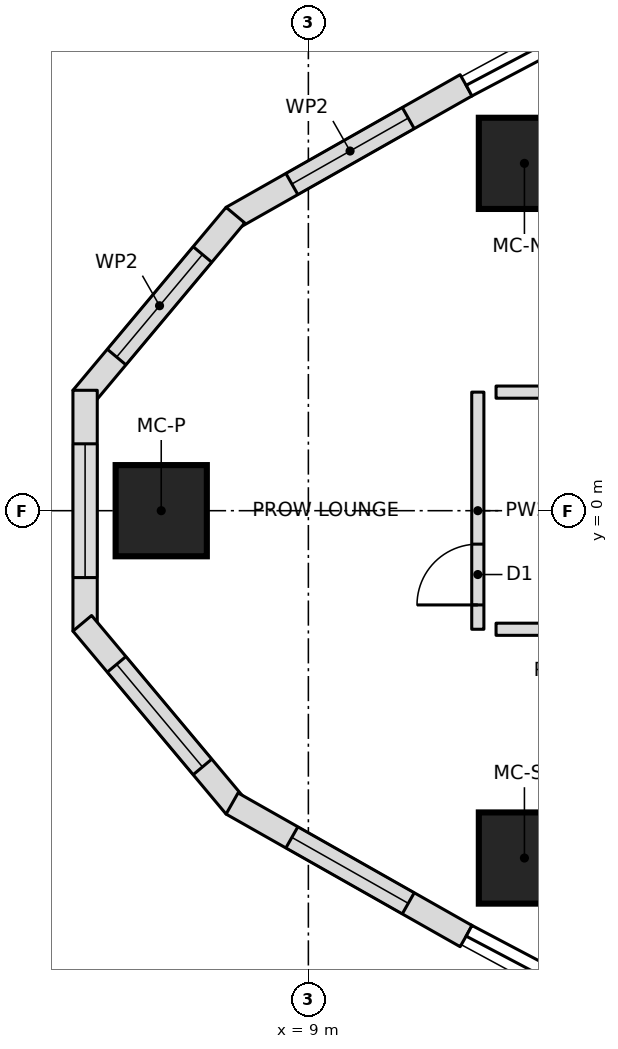
"""IFC4 building model, lengths in metres.
Left out: names, types, materials, properties, quantities, classifications, styles, units other than length and angle.
Written with IfcOpenShell. Run it as: python <this file> out.ifc"""

import sys

from ifc_helpers import new_model, si_unit, direction, frame, frame_2d, origin, origin_2d, place, context, subcontext, project, spatial, polyline, rectangle, outline, extrude, element, fill, save


model = new_model("IFC4")
c1 = context("Model", 3, precision=1e-05, world=origin(), true_north=direction((0.0, 1.0)))
c2 = subcontext(c1, "Body", "Model", "MODEL_VIEW")
j1 = project(units=[si_unit("LENGTHUNIT", "METRE"), si_unit("PLANEANGLEUNIT", "RADIAN")], contexts=[c1])
p1 = place(None, origin())
s1 = spatial("IfcSite", under=j1, at=p1, CompositionType="ELEMENT")
p2 = place(p1, origin())
s2 = spatial("IfcBuilding", under=s1, at=p2, CompositionType="ELEMENT")
p3 = place(p2, frame((0.0, 0.0, 137.3)))
s3 = spatial("IfcBuildingStorey", under=s2, at=p3, CompositionType="ELEMENT", Elevation=137.3)
for number, where, z_axis, x_axis in (
    (1, (6.58, 0.0, 0.0), (0.0, 0.0, 1.0), (1.0, 0.0, 0.0)),
    (2, (12.553, -5.713, 0.0), (0.0, 0.0, 1.0), (1.0, 0.0, 0.0)),
    (3, (12.553, 5.713, 0.0), (0.0, 0.0, 1.0), (1.0, 0.0, 0.0)),
):
    element("IfcColumn", number, at=place(p3, frame(where, z_axis=z_axis, x_axis=x_axis)), inside=s3, PredefinedType="COLUMN", context=c2, shape_type="SweptSolid", body=[
        extrude(rectangle(XDim=1.5, YDim=1.5, at=origin_2d()), origin(), (0.0, 0.0, 1.0), 3.55),
    ])
p4 = place(p3, frame((11.594, 6.997, 0.0), z_axis=(0.0, 0.0, 1.0), x_axis=(-0.870045255208, -0.492971859125, 0.0)))
e4 = element("IfcWall", 4, at=p4, inside=s3, PredefinedType="NOTDEFINED", context=c2, shape_type="SweptSolid", body=[
    extrude(outline(polyline([(0.0, -0.2), (4.424, -0.2), (4.352, 0.2), (0.0, 0.2), (0.0, -0.2)])), origin(), (0.0, 0.0, 1.0), 3.25),
])
p5 = place(p4, frame((1.094, 0.0, 0.6)))
e5 = element("IfcOpeningElement", 5, at=p5, cuts=e4, PredefinedType="OPENING", context=c2, shape_type="SweptSolid", body=[
    extrude(outline(polyline([(0.0, 1.35), (0.084, 1.771), (0.322, 2.128), (0.679, 2.366), (1.1, 2.45), (1.521, 2.366), (1.878, 2.128), (2.116, 1.771), (2.2, 1.35), (2.2, 1.1), (2.116, 0.679), (1.878, 0.322), (1.521, 0.084), (1.1, 0.0), (0.679, 0.084), (0.322, 0.322), (0.084, 0.679), (0.0, 1.1), (0.0, 1.35)])), frame((0.0, 0.21, 0.0), z_axis=(0.0, -1.0, 0.0), x_axis=(1.0, 0.0, 0.0)), (0.0, 0.0, 1.0), 0.42),
])
p6 = place(p3, frame((7.777, 4.834, 0.0), z_axis=(0.0, 0.0, 1.0), x_axis=(-0.641787918235, -0.766882173484, 0.0)))
e6 = element("IfcWall", 6, at=p6, inside=s3, PredefinedType="NOTDEFINED", context=c2, shape_type="SweptSolid", body=[
    extrude(outline(polyline([(-0.036, -0.2), (3.888, -0.2), (3.743, 0.2), (0.036, 0.2), (-0.036, -0.2)])), origin(), (0.0, 0.0, 1.0), 3.25),
])
p7 = place(p6, frame((0.808, 0.0, 0.6)))
e7 = element("IfcOpeningElement", 7, at=p7, cuts=e6, PredefinedType="OPENING", context=c2, shape_type="SweptSolid", body=[
    extrude(outline(polyline([(0.0, 1.35), (0.084, 1.771), (0.322, 2.128), (0.679, 2.366), (1.1, 2.45), (1.521, 2.366), (1.878, 2.128), (2.116, 1.771), (2.2, 1.35), (2.2, 1.1), (2.116, 0.679), (1.878, 0.322), (1.521, 0.084), (1.1, 0.0), (0.679, 0.084), (0.322, 0.322), (0.084, 0.679), (0.0, 1.1), (0.0, 1.35)])), frame((0.0, 0.21, 0.0), z_axis=(0.0, -1.0, 0.0), x_axis=(1.0, 0.0, 0.0)), (0.0, 0.0, 1.0), 0.42),
])
p8 = place(p3, frame((5.328, 1.908, 0.0), z_axis=(0.0, 0.0, 1.0), x_axis=(0.0, -1.0, 0.0)))
e8 = element("IfcWall", 8, at=p8, inside=s3, PredefinedType="NOTDEFINED", context=c2, shape_type="SweptSolid", body=[
    extrude(outline(polyline([(-0.073, -0.2), (3.888, -0.2), (3.743, 0.2), (0.073, 0.2), (-0.073, -0.2)])), origin(), (0.0, 0.0, 1.0), 3.25),
])
p9 = place(p8, frame((0.808, 0.0, 0.6)))
e9 = element("IfcOpeningElement", 9, at=p9, cuts=e8, PredefinedType="OPENING", context=c2, shape_type="SweptSolid", body=[
    extrude(outline(polyline([(0.0, 1.35), (0.084, 1.771), (0.322, 2.128), (0.679, 2.366), (1.1, 2.45), (1.521, 2.366), (1.878, 2.128), (2.116, 1.771), (2.2, 1.35), (2.2, 1.1), (2.116, 0.679), (1.878, 0.322), (1.521, 0.084), (1.1, 0.0), (0.679, 0.084), (0.322, 0.322), (0.084, 0.679), (0.0, 1.1), (0.0, 1.35)])), frame((0.0, 0.21, 0.0), z_axis=(0.0, -1.0, 0.0), x_axis=(1.0, 0.0, 0.0)), (0.0, 0.0, 1.0), 0.42),
])
p10 = place(p3, frame((5.328, -1.908, 0.0), z_axis=(0.0, 0.0, 1.0), x_axis=(0.641787918235, -0.766882173484, 0.0)))
e10 = element("IfcWall", 10, at=p10, inside=s3, PredefinedType="NOTDEFINED", context=c2, shape_type="SweptSolid", body=[
    extrude(outline(polyline([(-0.073, -0.2), (3.852, -0.2), (3.779, 0.2), (0.073, 0.2), (-0.073, -0.2)])), origin(), (0.0, 0.0, 1.0), 3.25),
])
p11 = place(p10, frame((0.808, 0.0, 0.6)))
e11 = element("IfcOpeningElement", 11, at=p11, cuts=e10, PredefinedType="OPENING", context=c2, shape_type="SweptSolid", body=[
    extrude(outline(polyline([(0.0, 1.35), (0.084, 1.771), (0.322, 2.128), (0.679, 2.366), (1.1, 2.45), (1.521, 2.366), (1.878, 2.128), (2.116, 1.771), (2.2, 1.35), (2.2, 1.1), (2.116, 0.679), (1.878, 0.322), (1.521, 0.084), (1.1, 0.0), (0.679, 0.084), (0.322, 0.322), (0.084, 0.679), (0.0, 1.1), (0.0, 1.35)])), frame((0.0, 0.21, 0.0), z_axis=(0.0, -1.0, 0.0), x_axis=(1.0, 0.0, 0.0)), (0.0, 0.0, 1.0), 0.42),
])
p12 = place(p3, frame((7.777, -4.834, 0.0), z_axis=(0.0, 0.0, 1.0), x_axis=(0.870045255208, -0.492971859125, 0.0)))
e12 = element("IfcWall", 12, at=p12, inside=s3, PredefinedType="NOTDEFINED", context=c2, shape_type="SweptSolid", body=[
    extrude(outline(polyline([(-0.036, -0.2), (4.388, -0.2), (4.388, 0.2), (0.036, 0.2), (-0.036, -0.2)])), origin(), (0.0, 0.0, 1.0), 3.25),
])
p13 = place(p12, frame((1.094, 0.0, 0.6)))
e13 = element("IfcOpeningElement", 13, at=p13, cuts=e12, PredefinedType="OPENING", context=c2, shape_type="SweptSolid", body=[
    extrude(outline(polyline([(0.0, 1.35), (0.084, 1.771), (0.322, 2.128), (0.679, 2.366), (1.1, 2.45), (1.521, 2.366), (1.878, 2.128), (2.116, 1.771), (2.2, 1.35), (2.2, 1.1), (2.116, 0.679), (1.878, 0.322), (1.521, 0.084), (1.1, 0.0), (0.679, 0.084), (0.322, 0.322), (0.084, 0.679), (0.0, 1.1), (0.0, 1.35)])), frame((0.0, 0.21, 0.0), z_axis=(0.0, -1.0, 0.0), x_axis=(1.0, 0.0, 0.0)), (0.0, 0.0, 1.0), 0.42),
])
p14 = place(p3, frame((12.087, 1.95, 0.0), z_axis=(0.0, 0.0, 1.0), x_axis=(1.0, 0.0, 0.0)))
e14 = element("IfcWall", 14, at=p14, inside=s3, PredefinedType="PARTITIONING", context=c2, shape_type="SweptSolid", body=[
    extrude(rectangle(XDim=3.372, YDim=0.2, at=frame_2d((1.686, 0.0))), origin(), (0.0, 0.0, 1.0), 3.25),
])
p15 = place(p14, frame((1.186, 0.0, 0.0)))
e15 = element("IfcOpeningElement", 15, at=p15, cuts=e14, PredefinedType="OPENING", context=c2, shape_type="SweptSolid", body=[
    extrude(rectangle(XDim=1.0, YDim=2.1, at=frame_2d((0.5, 1.05))), frame((0.0, 0.11, 0.0), z_axis=(0.0, -1.0, 0.0), x_axis=(1.0, 0.0, 0.0)), (0.0, 0.0, 1.0), 0.22),
])
p16 = place(p3, frame((12.087, -1.95, 0.0), z_axis=(0.0, 0.0, 1.0), x_axis=(1.0, 0.0, 0.0)))
e16 = element("IfcWall", 16, at=p16, inside=s3, PredefinedType="PARTITIONING", context=c2, shape_type="SweptSolid", body=[
    extrude(rectangle(XDim=3.372, YDim=0.2, at=frame_2d((1.686, 0.0))), origin(), (0.0, 0.0, 1.0), 3.25),
])
p17 = place(p16, frame((1.186, 0.0, 0.0)))
e17 = element("IfcOpeningElement", 17, at=p17, cuts=e16, PredefinedType="OPENING", context=c2, shape_type="SweptSolid", body=[
    extrude(rectangle(XDim=1.0, YDim=2.1, at=frame_2d((0.5, 1.05))), frame((0.0, 0.11, 0.0), z_axis=(0.0, -1.0, 0.0), x_axis=(1.0, 0.0, 0.0)), (0.0, 0.0, 1.0), 0.22),
])
p18 = place(p3, frame((11.787, -1.95, 0.0), z_axis=(0.0, 0.0, 1.0), x_axis=(0.0, 1.0, 0.0)))
e18 = element("IfcWall", 18, at=p18, inside=s3, PredefinedType="PARTITIONING", context=c2, shape_type="SweptSolid", body=[
    extrude(rectangle(XDim=3.9, YDim=0.2, at=frame_2d((1.95, 0.0))), origin(), (0.0, 0.0, 1.0), 3.25),
])
p19 = place(p18, frame((0.4, 0.0, 0.0)))
e19 = element("IfcOpeningElement", 19, at=p19, cuts=e18, PredefinedType="OPENING", context=c2, shape_type="SweptSolid", body=[
    extrude(rectangle(XDim=1.0, YDim=2.1, at=frame_2d((0.5, 1.05))), frame((0.0, 0.11, 0.0), z_axis=(0.0, -1.0, 0.0), x_axis=(1.0, 0.0, 0.0)), (0.0, 0.0, 1.0), 0.22),
])
p20 = place(p5, origin())
e20 = element("IfcWindow", 20, at=p20, inside=s3, PartitioningType="SINGLE_PANEL", PredefinedType="WINDOW", context=c2, shape_type="SweptSolid", body=[
    extrude(outline(polyline([(0.0, 1.35), (0.084, 1.771), (0.322, 2.128), (0.679, 2.366), (1.1, 2.45), (1.521, 2.366), (1.878, 2.128), (2.116, 1.771), (2.2, 1.35), (2.2, 1.1), (2.116, 0.679), (1.878, 0.322), (1.521, 0.084), (1.1, 0.0), (0.679, 0.084), (0.322, 0.322), (0.084, 0.679), (0.0, 1.1), (0.0, 1.35)])), frame((0.0, 0.17, 0.0), z_axis=(0.0, -1.0, 0.0), x_axis=(1.0, 0.0, 0.0)), (0.0, 0.0, 1.0), 0.06),
])
fill(e5, e20)
p21 = place(p7, origin())
e21 = element("IfcWindow", 21, at=p21, inside=s3, PartitioningType="SINGLE_PANEL", PredefinedType="WINDOW", context=c2, shape_type="SweptSolid", body=[
    extrude(outline(polyline([(0.0, 1.35), (0.084, 1.771), (0.322, 2.128), (0.679, 2.366), (1.1, 2.45), (1.521, 2.366), (1.878, 2.128), (2.116, 1.771), (2.2, 1.35), (2.2, 1.1), (2.116, 0.679), (1.878, 0.322), (1.521, 0.084), (1.1, 0.0), (0.679, 0.084), (0.322, 0.322), (0.084, 0.679), (0.0, 1.1), (0.0, 1.35)])), frame((0.0, 0.17, 0.0), z_axis=(0.0, -1.0, 0.0), x_axis=(1.0, 0.0, 0.0)), (0.0, 0.0, 1.0), 0.06),
])
fill(e7, e21)
p22 = place(p9, origin())
e22 = element("IfcWindow", 22, at=p22, inside=s3, PartitioningType="SINGLE_PANEL", PredefinedType="WINDOW", context=c2, shape_type="SweptSolid", body=[
    extrude(outline(polyline([(0.0, 1.35), (0.084, 1.771), (0.322, 2.128), (0.679, 2.366), (1.1, 2.45), (1.521, 2.366), (1.878, 2.128), (2.116, 1.771), (2.2, 1.35), (2.2, 1.1), (2.116, 0.679), (1.878, 0.322), (1.521, 0.084), (1.1, 0.0), (0.679, 0.084), (0.322, 0.322), (0.084, 0.679), (0.0, 1.1), (0.0, 1.35)])), frame((0.0, 0.17, 0.0), z_axis=(0.0, -1.0, 0.0), x_axis=(1.0, 0.0, 0.0)), (0.0, 0.0, 1.0), 0.06),
])
fill(e9, e22)
p23 = place(p11, origin())
e23 = element("IfcWindow", 23, at=p23, inside=s3, PartitioningType="SINGLE_PANEL", PredefinedType="WINDOW", context=c2, shape_type="SweptSolid", body=[
    extrude(outline(polyline([(0.0, 1.35), (0.084, 1.771), (0.322, 2.128), (0.679, 2.366), (1.1, 2.45), (1.521, 2.366), (1.878, 2.128), (2.116, 1.771), (2.2, 1.35), (2.2, 1.1), (2.116, 0.679), (1.878, 0.322), (1.521, 0.084), (1.1, 0.0), (0.679, 0.084), (0.322, 0.322), (0.084, 0.679), (0.0, 1.1), (0.0, 1.35)])), frame((0.0, 0.17, 0.0), z_axis=(0.0, -1.0, 0.0), x_axis=(1.0, 0.0, 0.0)), (0.0, 0.0, 1.0), 0.06),
])
fill(e11, e23)
p24 = place(p13, origin())
e24 = element("IfcWindow", 24, at=p24, inside=s3, PartitioningType="SINGLE_PANEL", PredefinedType="WINDOW", context=c2, shape_type="SweptSolid", body=[
    extrude(outline(polyline([(0.0, 1.35), (0.084, 1.771), (0.322, 2.128), (0.679, 2.366), (1.1, 2.45), (1.521, 2.366), (1.878, 2.128), (2.116, 1.771), (2.2, 1.35), (2.2, 1.1), (2.116, 0.679), (1.878, 0.322), (1.521, 0.084), (1.1, 0.0), (0.679, 0.084), (0.322, 0.322), (0.084, 0.679), (0.0, 1.1), (0.0, 1.35)])), frame((0.0, 0.17, 0.0), z_axis=(0.0, -1.0, 0.0), x_axis=(1.0, 0.0, 0.0)), (0.0, 0.0, 1.0), 0.06),
])
fill(e13, e24)
p25 = place(p19, origin())
e25 = element("IfcDoor", 25, at=p25, inside=s3, OperationType="SINGLE_SWING_LEFT", PredefinedType="DOOR", context=c2, shape_type="SweptSolid", body=[
    extrude(rectangle(XDim=1.0, YDim=2.1, at=frame_2d((0.5, 1.05))), frame((0.0, 0.025, 0.0), z_axis=(0.0, -1.0, 0.0), x_axis=(1.0, 0.0, 0.0)), (0.0, 0.0, 1.0), 0.05),
])
fill(e19, e25)
save(model, sys.argv[1])
